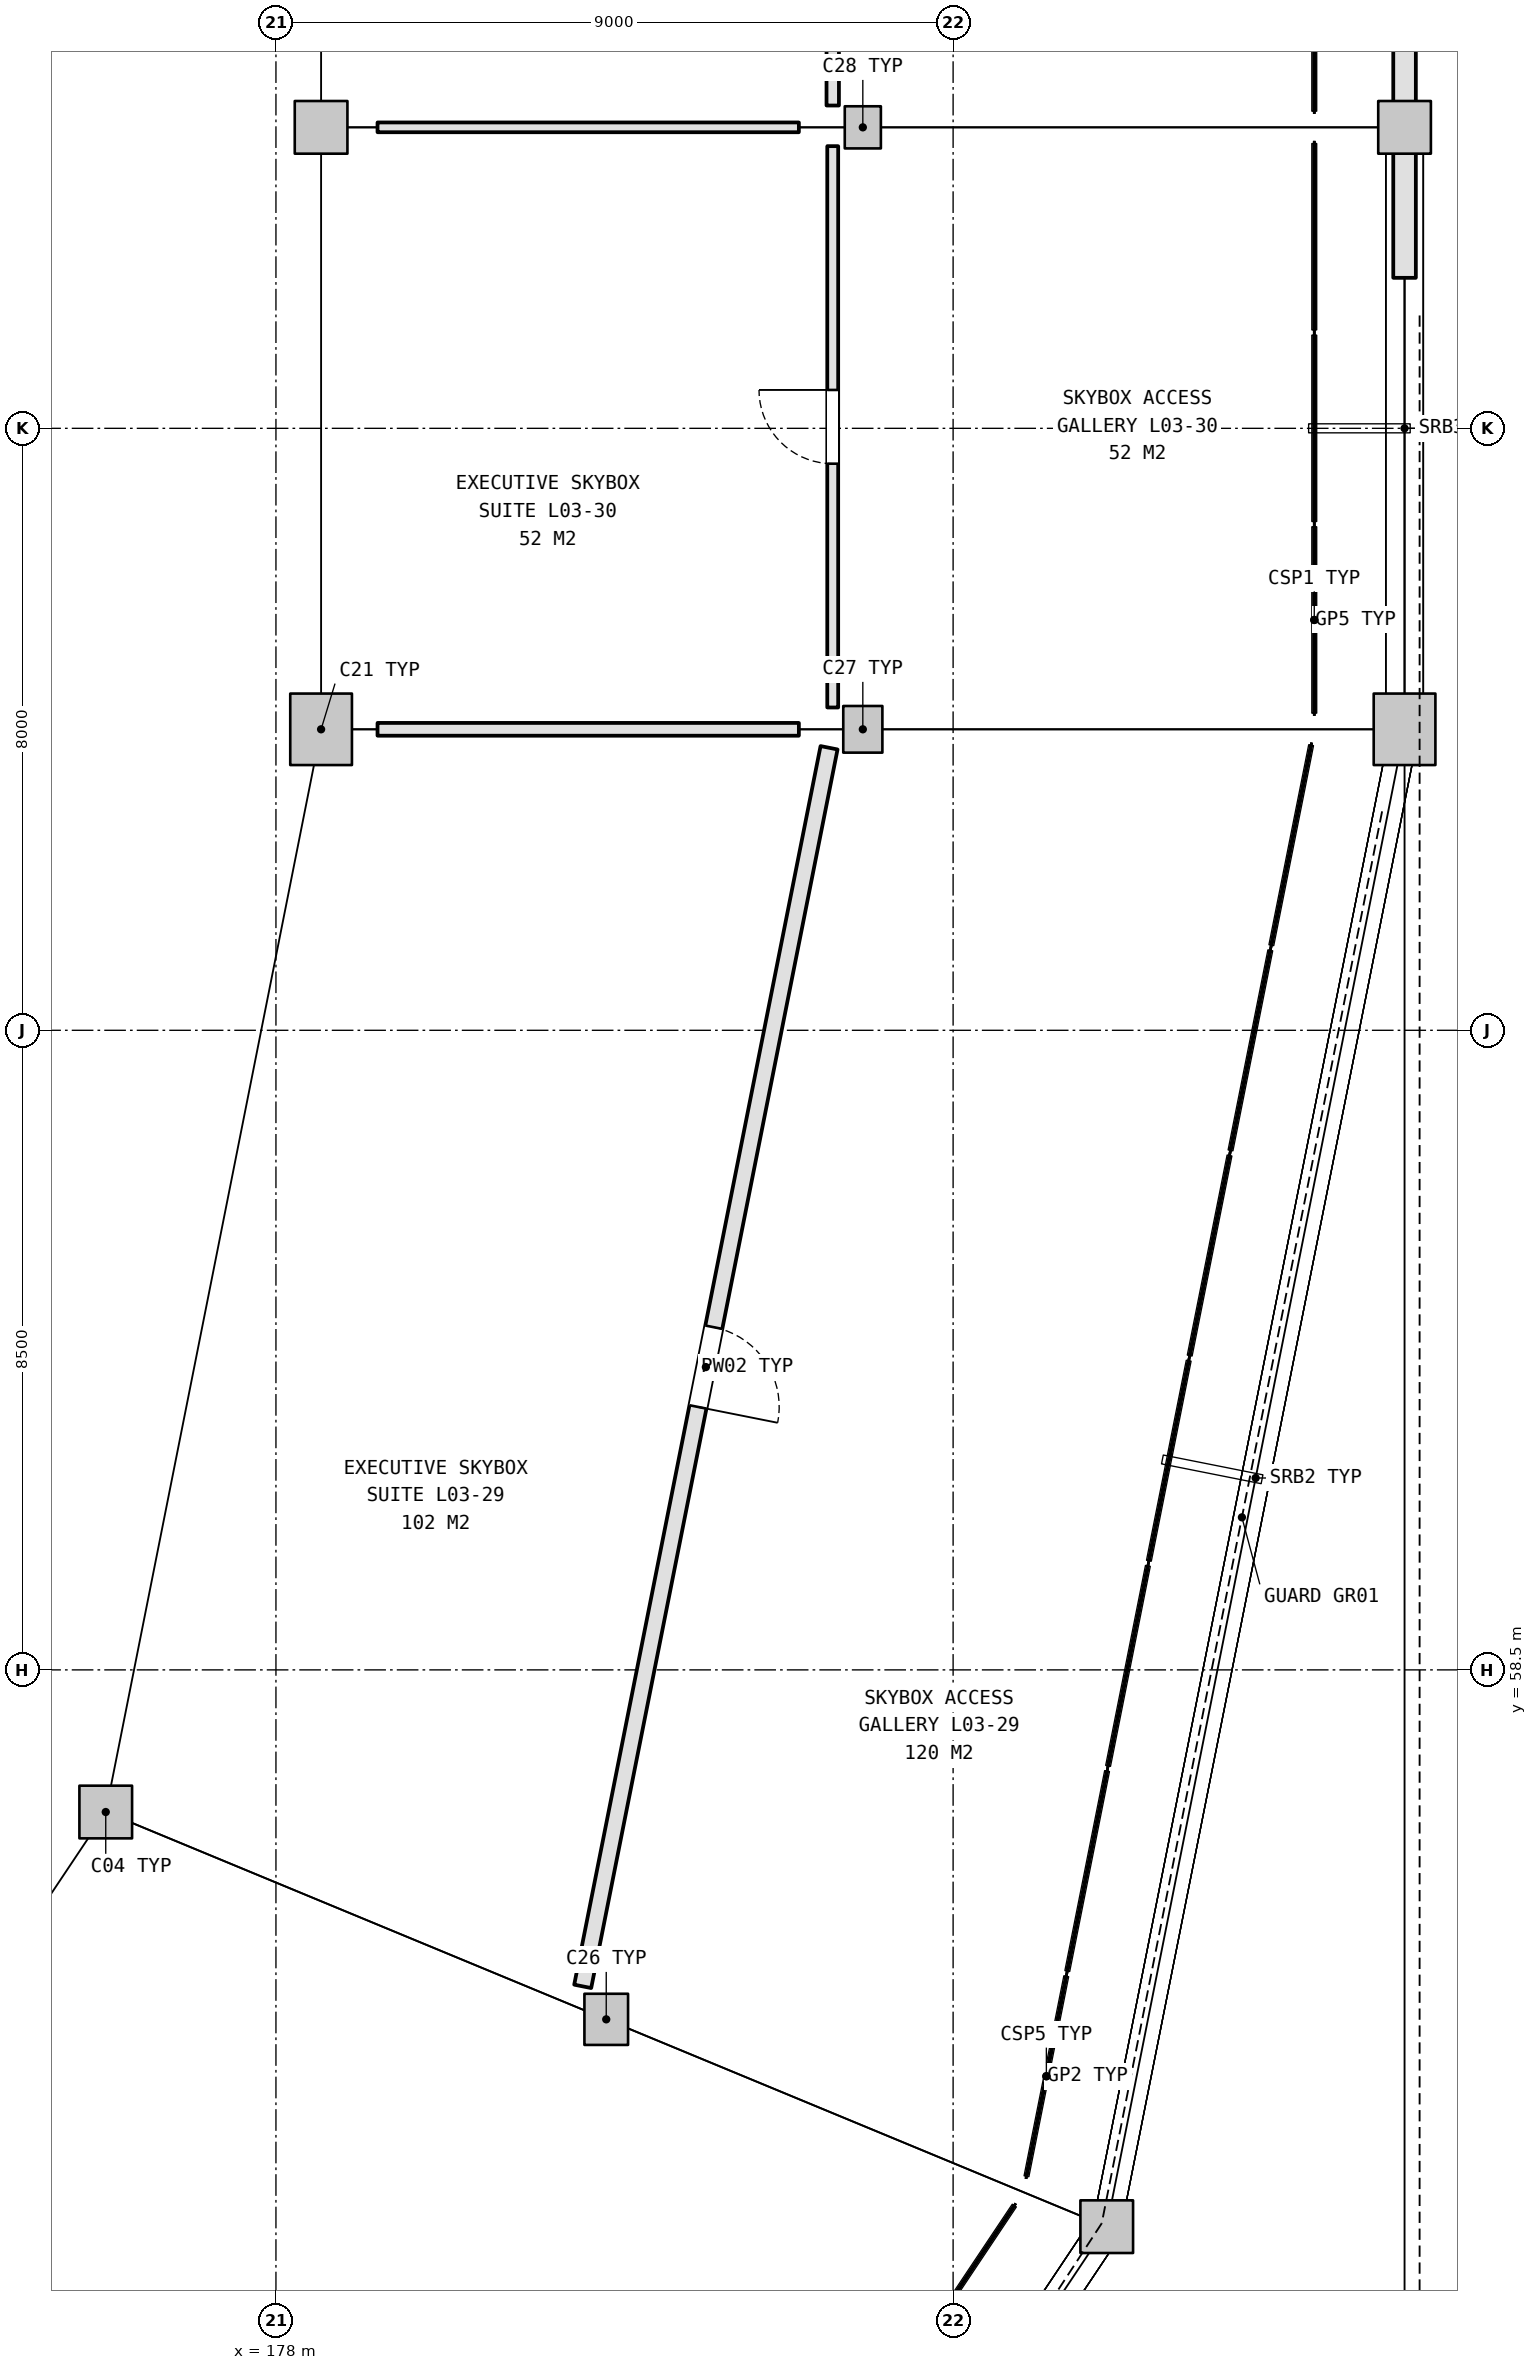
"""IFC4 building model, lengths in metres.
Left out: names, types, materials, properties, quantities, classifications, styles, units other than length and angle.
Written with IfcOpenShell. Run it as: python <this file> out.ifc"""

import sys

from ifc_helpers import new_model, si_unit, direction, frame, frame_2d, origin, origin_2d, place, context, subcontext, project, spatial, rectangle, extrude, element, fill, save


model = new_model("IFC4")
c1 = context("Model", 3, precision=1e-05, world=origin(), true_north=direction((0.0, 1.0)))
c2 = subcontext(c1, "Body", "Model", "MODEL_VIEW")
j1 = project(units=[si_unit("LENGTHUNIT", "METRE"), si_unit("PLANEANGLEUNIT", "RADIAN")], contexts=[c1])
p1 = place(None, origin())
s1 = spatial("IfcSite", under=j1, at=p1, CompositionType="ELEMENT")
p2 = place(p1, origin())
s2 = spatial("IfcBuilding", under=s1, at=p2, CompositionType="ELEMENT")
p3 = place(p2, frame((0.0, 0.0, 16.2)))
s3 = spatial("IfcBuildingStorey", under=s2, at=p3, CompositionType="ELEMENT", Elevation=16.2)
p4 = place(p3, frame((175.738, 56.611, 0.0), z_axis=(0.0, 0.0, 1.0), x_axis=(1.0, 0.0, 0.0)))
e1 = element("IfcColumn", 1, at=p4, inside=s3, PredefinedType="COLUMN", context=c2, shape_type="SweptSolid", body=[
    extrude(rectangle(XDim=0.7, YDim=0.7, at=origin_2d()), origin(), (0.0, 0.0, 1.0), 5.4),
])
p5 = place(p3, frame((182.39, 53.856, 0.0), z_axis=(0.0, 0.0, 1.0), x_axis=(1.0, 0.0, 0.0)))
e2 = element("IfcColumn", 2, at=p5, inside=s3, PredefinedType="COLUMN", context=c2, shape_type="SweptSolid", body=[
    extrude(rectangle(XDim=0.58, YDim=0.68, at=origin_2d()), origin(), (0.0, 0.0, 1.0), 5.4),
])
p6 = place(p3, frame((189.042, 51.1, 0.0), z_axis=(0.0, 0.0, 1.0), x_axis=(1.0, 0.0, 0.0)))
e3 = element("IfcColumn", 3, at=p6, inside=s3, PredefinedType="COLUMN", context=c2, shape_type="SweptSolid", body=[
    extrude(rectangle(XDim=0.7, YDim=0.7, at=origin_2d()), origin(), (0.0, 0.0, 1.0), 5.4),
])
p7 = place(p3, frame((178.6, 71.0, 0.0), z_axis=(0.0, 0.0, 1.0), x_axis=(1.0, 0.0, 0.0)))
e4 = element("IfcColumn", 4, at=p7, inside=s3, PredefinedType="COLUMN", context=c2, shape_type="SweptSolid", body=[
    extrude(rectangle(XDim=0.82, YDim=0.95, at=origin_2d()), origin(), (0.0, 0.0, 1.0), 5.4),
])
p8 = place(p3, frame((185.8, 71.0, 0.0), z_axis=(0.0, 0.0, 1.0), x_axis=(1.0, 0.0, 0.0)))
e5 = element("IfcColumn", 5, at=p8, inside=s3, PredefinedType="COLUMN", context=c2, shape_type="SweptSolid", body=[
    extrude(rectangle(XDim=0.52, YDim=0.62, at=origin_2d()), origin(), (0.0, 0.0, 1.0), 5.4),
])
p9 = place(p3, frame((193.0, 71.0, 0.0), z_axis=(0.0, 0.0, 1.0), x_axis=(1.0, 0.0, 0.0)))
e6 = element("IfcColumn", 6, at=p9, inside=s3, PredefinedType="COLUMN", context=c2, shape_type="SweptSolid", body=[
    extrude(rectangle(XDim=0.82, YDim=0.95, at=origin_2d()), origin(), (0.0, 0.0, 1.0), 5.4),
])
p10 = place(p3, frame((178.6, 79.0, 0.0), z_axis=(0.0, 0.0, 1.0), x_axis=(1.0, 0.0, 0.0)))
e7 = element("IfcColumn", 7, at=p10, inside=s3, PredefinedType="COLUMN", context=c2, shape_type="SweptSolid", body=[
    extrude(rectangle(XDim=0.7, YDim=0.7, at=origin_2d()), origin(), (0.0, 0.0, 1.0), 5.4),
])
p11 = place(p3, frame((185.8, 79.0, 0.0), z_axis=(0.0, 0.0, 1.0), x_axis=(1.0, 0.0, 0.0)))
e8 = element("IfcColumn", 8, at=p11, inside=s3, PredefinedType="COLUMN", context=c2, shape_type="SweptSolid", body=[
    extrude(rectangle(XDim=0.48, YDim=0.56, at=origin_2d()), origin(), (0.0, 0.0, 1.0), 5.4),
])
p12 = place(p3, frame((193.0, 79.0, 0.0), z_axis=(0.0, 0.0, 1.0), x_axis=(1.0, 0.0, 0.0)))
e9 = element("IfcColumn", 9, at=p12, inside=s3, PredefinedType="COLUMN", context=c2, shape_type="SweptSolid", body=[
    extrude(rectangle(XDim=0.7, YDim=0.7, at=origin_2d()), origin(), (0.0, 0.0, 1.0), 5.4),
])
p13 = place(p3, frame((193.0, 77.0, 0.0), z_axis=(0.0, 0.0, 1.0), x_axis=(0.0, 1.0, 0.0)))
e10 = element("IfcWall", 10, at=p13, inside=s3, PredefinedType="SOLIDWALL", context=c2, shape_type="SweptSolid", body=[
    extrude(rectangle(XDim=12.0, YDim=0.3, at=frame_2d((6.0, 0.0))), origin(), (0.0, 0.0, 1.0), 4.205),
])
p14 = place(p13, frame((5.1, 0.0, 0.0)))
e11 = element("IfcOpeningElement", 11, at=p14, cuts=e10, PredefinedType="OPENING", context=c2, shape_type="SweptSolid", body=[
    extrude(rectangle(XDim=1.8, YDim=2.2, at=frame_2d((0.9, 1.1))), frame((0.0, 0.16, 0.0), z_axis=(0.0, -1.0, 0.0), x_axis=(1.0, 0.0, 0.0)), (0.0, 0.0, 1.0), 0.32),
])
p15 = place(p3, frame((185.351, 70.755, 0.0), z_axis=(0.0, 0.0, 1.0), x_axis=(-0.195100557291, -0.980783244425, 0.0)))
e12 = element("IfcWall", 12, at=p15, inside=s3, PredefinedType="PLUMBINGWALL", context=c2, shape_type="SweptSolid", body=[
    extrude(rectangle(XDim=16.783, YDim=0.23, at=frame_2d((8.392, 0.0))), origin(), (0.0, 0.0, 1.0), 4.365),
])
p16 = place(p15, frame((7.852, 0.0, 0.0)))
e13 = element("IfcOpeningElement", 13, at=p16, cuts=e12, PredefinedType="OPENING", context=c2, shape_type="SweptSolid", body=[
    extrude(rectangle(XDim=1.08, YDim=2.25, at=frame_2d((0.54, 1.125))), frame((0.0, 0.125, 0.0), z_axis=(0.0, -1.0, 0.0), x_axis=(1.0, 0.0, 0.0)), (0.0, 0.0, 1.0), 0.25),
])
p17 = place(p3, frame((179.35, 71.0, 0.0), z_axis=(0.0, 0.0, 1.0), x_axis=(1.0, 0.0, 0.0)))
e14 = element("IfcWall", 14, at=p17, inside=s3, PredefinedType="PARTITIONING", context=c2, shape_type="SweptSolid", body=[
    extrude(rectangle(XDim=5.6, YDim=0.17, at=frame_2d((2.8, 0.0))), origin(), (0.0, 0.0, 1.0), 4.385),
])
p18 = place(p3, frame((185.4, 78.75, 0.0), z_axis=(0.0, 0.0, 1.0), x_axis=(0.0, -1.0, 0.0)))
e15 = element("IfcWall", 15, at=p18, inside=s3, PredefinedType="PARTITIONING", context=c2, shape_type="SweptSolid", body=[
    extrude(rectangle(XDim=7.46, YDim=0.145, at=frame_2d((3.73, 0.0))), origin(), (0.0, 0.0, 1.0), 4.305),
])
p19 = place(p18, frame((3.24, 0.0, 0.0)))
e16 = element("IfcOpeningElement", 16, at=p19, cuts=e15, PredefinedType="OPENING", context=c2, shape_type="SweptSolid", body=[
    extrude(rectangle(XDim=0.98, YDim=2.15, at=frame_2d((0.49, 1.075))), frame((0.0, 0.083, 0.0), z_axis=(0.0, -1.0, 0.0), x_axis=(1.0, 0.0, 0.0)), (0.0, 0.0, 1.0), 0.165),
])
p20 = place(p3, frame((179.35, 79.0, 0.0), z_axis=(0.0, 0.0, 1.0), x_axis=(1.0, 0.0, 0.0)))
e17 = element("IfcWall", 17, at=p20, inside=s3, PredefinedType="PARTITIONING", context=c2, shape_type="SweptSolid", body=[
    extrude(rectangle(XDim=5.6, YDim=0.13, at=frame_2d((2.8, 0.0))), origin(), (0.0, 0.0, 1.0), 4.305),
])
p21 = place(p3, frame((185.4, 86.75, 0.0), z_axis=(0.0, 0.0, 1.0), x_axis=(0.0, -1.0, 0.0)))
e18 = element("IfcWall", 18, at=p21, inside=s3, PredefinedType="PARTITIONING", context=c2, shape_type="SweptSolid", body=[
    extrude(rectangle(XDim=7.46, YDim=0.165, at=frame_2d((3.73, 0.0))), origin(), (0.0, 0.0, 1.0), 4.305),
])
p22 = place(p21, frame((3.22, 0.0, 0.0)))
e19 = element("IfcOpeningElement", 19, at=p22, cuts=e18, PredefinedType="OPENING", context=c2, shape_type="SweptSolid", body=[
    extrude(rectangle(XDim=1.02, YDim=2.15, at=frame_2d((0.51, 1.075))), frame((0.0, 0.093, 0.0), z_axis=(0.0, -1.0, 0.0), x_axis=(1.0, 0.0, 0.0)), (0.0, 0.0, 1.0), 0.185),
])
p23 = place(p16, origin())
e20 = element("IfcDoor", 20, at=p23, inside=s3, OperationType="SINGLE_SWING_RIGHT", PredefinedType="DOOR", context=c2, shape_type="SweptSolid", body=[
    extrude(rectangle(XDim=1.08, YDim=2.25, at=frame_2d((0.54, 1.125))), frame((0.0, 0.025, 0.0), z_axis=(0.0, -1.0, 0.0), x_axis=(1.0, 0.0, 0.0)), (0.0, 0.0, 1.0), 0.05),
])
fill(e13, e20)
p24 = place(p19, frame((0.98, 0.0, 0.0), z_axis=(0.0, 0.0, 1.0), x_axis=(-1.0, 0.0, 0.0)))
e21 = element("IfcDoor", 21, at=p24, inside=s3, OperationType="SINGLE_SWING_LEFT", PredefinedType="DOOR", context=c2, shape_type="SweptSolid", body=[
    extrude(rectangle(XDim=0.98, YDim=2.15, at=frame_2d((0.49, 1.075))), frame((0.0, 0.025, 0.0), z_axis=(0.0, -1.0, 0.0), x_axis=(1.0, 0.0, 0.0)), (0.0, 0.0, 1.0), 0.05),
])
fill(e16, e21)
save(model, sys.argv[1])
